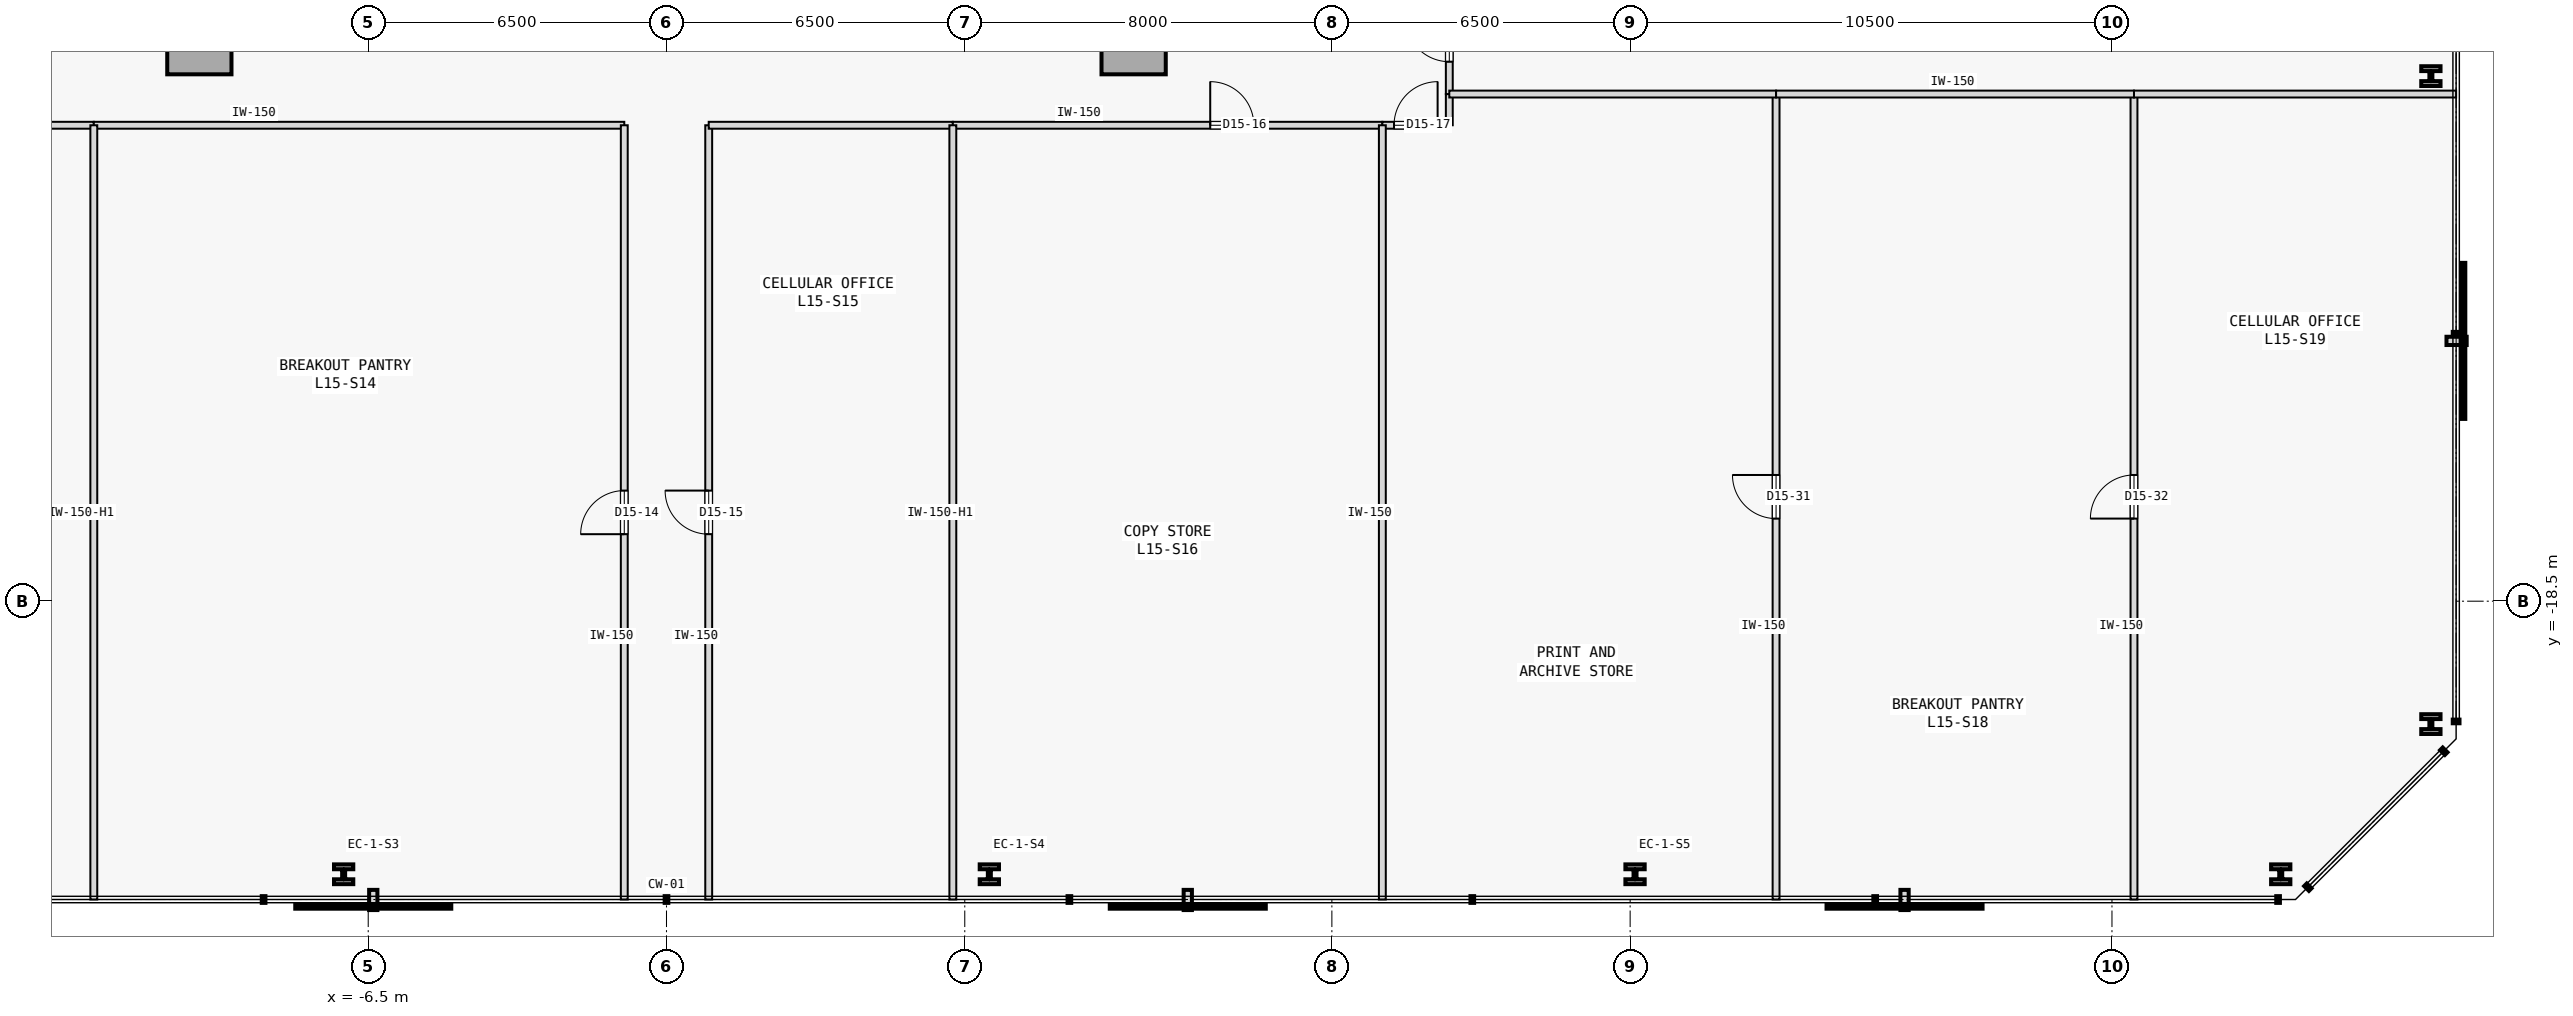
"""IFC4 building model, lengths in metres.
Left out: names, types, materials, properties, quantities, classifications, styles, units other than length and angle.
Written with IfcOpenShell. Run it as: python <this file> out.ifc"""

import sys

from ifc_helpers import new_model, si_unit, direction, frame, frame_2d, origin, origin_2d, place, context, subcontext, project, spatial, rectangle, i_section, extrude, element, fill, save


model = new_model("IFC4")
c1 = context("Model", 3, precision=1e-05, world=origin(), true_north=direction((0.0, 1.0)))
c2 = subcontext(c1, "Body", "Model", "MODEL_VIEW")
j1 = project(units=[si_unit("LENGTHUNIT", "METRE"), si_unit("PLANEANGLEUNIT", "RADIAN")], contexts=[c1])
p1 = place(None, origin())
s1 = spatial("IfcSite", under=j1, at=p1, CompositionType="ELEMENT")
p2 = place(p1, origin())
s2 = spatial("IfcBuilding", under=s1, at=p2, CompositionType="ELEMENT")
p3 = place(p2, frame((0.0, 0.0, 63.6)))
s3 = spatial("IfcBuildingStorey", under=s2, at=p3, CompositionType="ELEMENT", Elevation=63.6)
for number, where, z_axis, x_axis in (
    (1, (-10.18, -6.32, 0.0), (0.0, 0.0, 1.0), (1.0, 0.0, 0.0)),
    (2, (10.18, -6.32, 0.0), (0.0, 0.0, 1.0), (1.0, 0.0, 0.0)),
):
    element("IfcColumn", number, at=place(p3, frame(where, z_axis=z_axis, x_axis=x_axis)), inside=s3, PredefinedType="COLUMN", context=c2, shape_type="SweptSolid", body=[
        extrude(rectangle(XDim=1.4, YDim=1.4, at=origin_2d()), origin(), (0.0, 0.0, 1.0), 3.8),
    ])
for number, where, z_axis, x_axis in (
    (3, (-7.036, -24.45, 0.0), (0.0, 0.0, 1.0), (1.0, 0.0, 0.0)),
    (4, (7.036, -24.45, 0.0), (0.0, 0.0, 1.0), (1.0, 0.0, 0.0)),
    (5, (21.107, -24.45, 0.0), (0.0, 0.0, 1.0), (1.0, 0.0, 0.0)),
    (6, (35.178, -24.45, 0.0), (0.0, 0.0, 1.0), (1.0, 0.0, 0.0)),
    (7, (38.45, -21.178, 0.0), (0.0, 0.0, 1.0), (1.0, 0.0, 0.0)),
    (8, (38.45, -7.059, 0.0), (0.0, 0.0, 1.0), (1.0, 0.0, 0.0)),
):
    element("IfcColumn", number, at=place(p3, frame(where, z_axis=z_axis, x_axis=x_axis)), inside=s3, PredefinedType="COLUMN", context=c2, shape_type="SweptSolid", body=[
        extrude(i_section(OverallWidth=0.42, OverallDepth=0.431, WebThickness=0.065, FlangeThickness=0.106, FilletRadius=0.015, at=origin_2d()), origin(), (0.0, 0.0, 1.0), 3.8),
    ])
p4 = place(p3, frame((-17.059, -8.13, 0.0), z_axis=(0.0, 0.0, 1.0), x_axis=(1.0, 0.0, 0.0)))
e9 = element("IfcWall", 9, at=p4, inside=s3, PredefinedType="PARTITIONING", context=c2, shape_type="SweptSolid", body=[
    extrude(rectangle(XDim=4.579, YDim=0.15, at=frame_2d((2.29, 0.0))), origin(), (0.0, 0.0, 1.0), 3.575),
])
p5 = place(p4, frame((1.814, 0.0, 0.0)))
e10 = element("IfcOpeningElement", 10, at=p5, cuts=e9, PredefinedType="OPENING", context=c2, shape_type="SweptSolid", body=[
    extrude(rectangle(XDim=0.95, YDim=2.15, at=frame_2d((0.475, 1.075))), frame((0.0, 0.085, 0.0), z_axis=(0.0, -1.0, 0.0), x_axis=(1.0, 0.0, 0.0)), (0.0, 0.0, 1.0), 0.17),
])
p6 = place(p3, frame((-12.48, -8.13, 0.0), z_axis=(0.0, 0.0, 1.0), x_axis=(1.0, 0.0, 0.0)))
e11 = element("IfcWall", 11, at=p6, inside=s3, PredefinedType="PARTITIONING", context=c2, shape_type="SweptSolid", body=[
    extrude(rectangle(XDim=11.56, YDim=0.15, at=frame_2d((5.78, 0.0))), origin(), (0.0, 0.0, 1.0), 3.575),
])
p7 = place(p3, frame((-0.92, -25.0, 0.0), z_axis=(0.0, 0.0, 1.0), x_axis=(0.0, 1.0, 0.0)))
e12 = element("IfcWall", 12, at=p7, inside=s3, PredefinedType="PARTITIONING", context=c2, shape_type="SweptSolid", body=[
    extrude(rectangle(XDim=16.87, YDim=0.15, at=frame_2d((8.435, 0.0))), origin(), (0.0, 0.0, 1.0), 3.575),
])
p8 = place(p7, frame((7.96, 0.0, 0.0)))
e13 = element("IfcOpeningElement", 13, at=p8, cuts=e12, PredefinedType="OPENING", context=c2, shape_type="SweptSolid", body=[
    extrude(rectangle(XDim=0.95, YDim=2.15, at=frame_2d((0.475, 1.075))), frame((0.0, 0.085, 0.0), z_axis=(0.0, -1.0, 0.0), x_axis=(1.0, 0.0, 0.0)), (0.0, 0.0, 1.0), 0.17),
])
p9 = place(p3, frame((0.92, -25.0, 0.0), z_axis=(0.0, 0.0, 1.0), x_axis=(0.0, 1.0, 0.0)))
e14 = element("IfcWall", 14, at=p9, inside=s3, PredefinedType="PARTITIONING", context=c2, shape_type="SweptSolid", body=[
    extrude(rectangle(XDim=16.87, YDim=0.15, at=frame_2d((8.435, 0.0))), origin(), (0.0, 0.0, 1.0), 3.575),
])
p10 = place(p9, frame((7.96, 0.0, 0.0)))
e15 = element("IfcOpeningElement", 15, at=p10, cuts=e14, PredefinedType="OPENING", context=c2, shape_type="SweptSolid", body=[
    extrude(rectangle(XDim=0.95, YDim=2.15, at=frame_2d((0.475, 1.075))), frame((0.0, 0.085, 0.0), z_axis=(0.0, -1.0, 0.0), x_axis=(1.0, 0.0, 0.0)), (0.0, 0.0, 1.0), 0.17),
])
p11 = place(p3, frame((0.92, -8.13, 0.0), z_axis=(0.0, 0.0, 1.0), x_axis=(1.0, 0.0, 0.0)))
e16 = element("IfcWall", 16, at=p11, inside=s3, PredefinedType="PARTITIONING", context=c2, shape_type="SweptSolid", body=[
    extrude(rectangle(XDim=5.32, YDim=0.15, at=frame_2d((2.66, 0.0))), origin(), (0.0, 0.0, 1.0), 3.575),
])
p12 = place(p3, frame((6.24, -8.13, 0.0), z_axis=(0.0, 0.0, 1.0), x_axis=(1.0, 0.0, 0.0)))
e17 = element("IfcWall", 17, at=p12, inside=s3, PredefinedType="PARTITIONING", context=c2, shape_type="SweptSolid", body=[
    extrude(rectangle(XDim=9.36, YDim=0.15, at=frame_2d((4.68, 0.0))), origin(), (0.0, 0.0, 1.0), 3.575),
])
p13 = place(p12, frame((5.609, 0.0, 0.0)))
e18 = element("IfcOpeningElement", 18, at=p13, cuts=e17, PredefinedType="OPENING", context=c2, shape_type="SweptSolid", body=[
    extrude(rectangle(XDim=0.95, YDim=2.15, at=frame_2d((0.475, 1.075))), frame((0.0, 0.085, 0.0), z_axis=(0.0, -1.0, 0.0), x_axis=(1.0, 0.0, 0.0)), (0.0, 0.0, 1.0), 0.17),
])
p14 = place(p3, frame((15.6, -8.13, 0.0), z_axis=(0.0, 0.0, 1.0), x_axis=(1.0, 0.0, 0.0)))
e19 = element("IfcWall", 19, at=p14, inside=s3, PredefinedType="PARTITIONING", context=c2, shape_type="SweptSolid", body=[
    extrude(rectangle(XDim=1.459, YDim=0.15, at=frame_2d((0.729, 0.0))), origin(), (0.0, 0.0, 1.0), 3.575),
])
p15 = place(p14, frame((0.254, 0.0, 0.0)))
e20 = element("IfcOpeningElement", 20, at=p15, cuts=e19, PredefinedType="OPENING", context=c2, shape_type="SweptSolid", body=[
    extrude(rectangle(XDim=0.95, YDim=2.15, at=frame_2d((0.475, 1.075))), frame((0.0, 0.085, 0.0), z_axis=(0.0, -1.0, 0.0), x_axis=(1.0, 0.0, 0.0)), (0.0, 0.0, 1.0), 0.17),
])
p16 = place(p3, frame((17.059, -8.13, 0.0), z_axis=(0.0, 0.0, 1.0), x_axis=(0.0, 1.0, 0.0)))
e21 = element("IfcWall", 21, at=p16, inside=s3, PredefinedType="PARTITIONING", context=c2, shape_type="SweptSolid", body=[
    extrude(rectangle(XDim=0.68, YDim=0.15, at=frame_2d((0.34, 0.0))), origin(), (0.0, 0.0, 1.0), 3.575),
])
p17 = place(p3, frame((17.059, -7.45, 0.0), z_axis=(0.0, 0.0, 1.0), x_axis=(0.0, 1.0, 0.0)))
e22 = element("IfcWall", 22, at=p17, inside=s3, PredefinedType="PARTITIONING", context=c2, shape_type="SweptSolid", body=[
    extrude(rectangle(XDim=5.364, YDim=0.15, at=frame_2d((2.682, 0.0))), origin(), (0.0, 0.0, 1.0), 3.575),
])
p18 = place(p17, frame((0.705, 0.0, 0.0)))
e23 = element("IfcOpeningElement", 23, at=p18, cuts=e22, PredefinedType="OPENING", context=c2, shape_type="SweptSolid", body=[
    extrude(rectangle(XDim=0.95, YDim=2.15, at=frame_2d((0.475, 1.075))), frame((0.0, 0.085, 0.0), z_axis=(0.0, -1.0, 0.0), x_axis=(1.0, 0.0, 0.0)), (0.0, 0.0, 1.0), 0.17),
])
for number, where, z_axis, x_axis in (
    (24, (-12.48, -25.0, 0.0), (0.0, 0.0, 1.0), (0.0, 1.0, 0.0)),
    (25, (6.24, -25.0, 0.0), (0.0, 0.0, 1.0), (0.0, 1.0, 0.0)),
):
    element("IfcWall", number, at=place(p3, frame(where, z_axis=z_axis, x_axis=x_axis)), inside=s3, PredefinedType="PARTITIONING", context=c2, shape_type="SweptSolid", body=[
        extrude(rectangle(XDim=16.87, YDim=0.15, at=frame_2d((8.435, 0.0))), origin(), (0.0, 0.0, 1.0), 3.125),
    ])
p19 = place(p3, frame((15.6, -25.0, 0.0), z_axis=(0.0, 0.0, 1.0), x_axis=(0.0, 1.0, 0.0)))
e26 = element("IfcWall", 26, at=p19, inside=s3, PredefinedType="PARTITIONING", context=c2, shape_type="SweptSolid", body=[
    extrude(rectangle(XDim=16.87, YDim=0.15, at=frame_2d((8.435, 0.0))), origin(), (0.0, 0.0, 1.0), 3.575),
])
p20 = place(p3, frame((24.18, -25.0, 0.0), z_axis=(0.0, 0.0, 1.0), x_axis=(0.0, 1.0, 0.0)))
e27 = element("IfcWall", 27, at=p20, inside=s3, PredefinedType="PARTITIONING", context=c2, shape_type="SweptSolid", body=[
    extrude(rectangle(XDim=17.55, YDim=0.15, at=frame_2d((8.775, 0.0))), origin(), (0.0, 0.0, 1.0), 3.575),
])
p21 = place(p20, frame((8.3, 0.0, 0.0)))
e28 = element("IfcOpeningElement", 28, at=p21, cuts=e27, PredefinedType="OPENING", context=c2, shape_type="SweptSolid", body=[
    extrude(rectangle(XDim=0.95, YDim=2.15, at=frame_2d((0.475, 1.075))), frame((0.0, 0.085, 0.0), z_axis=(0.0, -1.0, 0.0), x_axis=(1.0, 0.0, 0.0)), (0.0, 0.0, 1.0), 0.17),
])
p22 = place(p3, frame((17.059, -7.45, 0.0), z_axis=(0.0, 0.0, 1.0), x_axis=(1.0, 0.0, 0.0)))
e29 = element("IfcWall", 29, at=p22, inside=s3, PredefinedType="PARTITIONING", context=c2, shape_type="SweptSolid", body=[
    extrude(rectangle(XDim=7.121, YDim=0.15, at=frame_2d((3.561, 0.0))), origin(), (0.0, 0.0, 1.0), 3.575),
])
p23 = place(p3, frame((31.98, -25.0, 0.0), z_axis=(0.0, 0.0, 1.0), x_axis=(0.0, 1.0, 0.0)))
e30 = element("IfcWall", 30, at=p23, inside=s3, PredefinedType="PARTITIONING", context=c2, shape_type="SweptSolid", body=[
    extrude(rectangle(XDim=17.55, YDim=0.15, at=frame_2d((8.775, 0.0))), origin(), (0.0, 0.0, 1.0), 3.575),
])
p24 = place(p23, frame((8.3, 0.0, 0.0)))
e31 = element("IfcOpeningElement", 31, at=p24, cuts=e30, PredefinedType="OPENING", context=c2, shape_type="SweptSolid", body=[
    extrude(rectangle(XDim=0.95, YDim=2.15, at=frame_2d((0.475, 1.075))), frame((0.0, 0.085, 0.0), z_axis=(0.0, -1.0, 0.0), x_axis=(1.0, 0.0, 0.0)), (0.0, 0.0, 1.0), 0.17),
])
p25 = place(p3, frame((24.18, -7.45, 0.0), z_axis=(0.0, 0.0, 1.0), x_axis=(1.0, 0.0, 0.0)))
e32 = element("IfcWall", 32, at=p25, inside=s3, PredefinedType="PARTITIONING", context=c2, shape_type="SweptSolid", body=[
    extrude(rectangle(XDim=7.8, YDim=0.15, at=frame_2d((3.9, 0.0))), origin(), (0.0, 0.0, 1.0), 3.575),
])
p26 = place(p3, frame((31.98, -7.45, 0.0), z_axis=(0.0, 0.0, 1.0), x_axis=(1.0, 0.0, 0.0)))
e33 = element("IfcWall", 33, at=p26, inside=s3, PredefinedType="PARTITIONING", context=c2, shape_type="SweptSolid", body=[
    extrude(rectangle(XDim=7.02, YDim=0.15, at=frame_2d((3.51, 0.0))), origin(), (0.0, 0.0, 1.0), 3.575),
])
p27 = place(p8, origin())
e34 = element("IfcDoor", 34, at=p27, inside=s3, OperationType="SINGLE_SWING_LEFT", PredefinedType="DOOR", context=c2, shape_type="SweptSolid", body=[
    extrude(rectangle(XDim=0.95, YDim=2.15, at=frame_2d((0.475, 1.075))), frame((0.0, 0.025, 0.0), z_axis=(0.0, -1.0, 0.0), x_axis=(1.0, 0.0, 0.0)), (0.0, 0.0, 1.0), 0.05),
])
fill(e13, e34)
p28 = place(p10, origin())
e35 = element("IfcDoor", 35, at=p28, inside=s3, OperationType="SINGLE_SWING_RIGHT", PredefinedType="DOOR", context=c2, shape_type="SweptSolid", body=[
    extrude(rectangle(XDim=0.95, YDim=2.15, at=frame_2d((0.475, 1.075))), frame((0.0, 0.025, 0.0), z_axis=(0.0, -1.0, 0.0), x_axis=(1.0, 0.0, 0.0)), (0.0, 0.0, 1.0), 0.05),
])
fill(e15, e35)
p29 = place(p13, origin())
e36 = element("IfcDoor", 36, at=p29, inside=s3, OperationType="SINGLE_SWING_LEFT", PredefinedType="DOOR", context=c2, shape_type="SweptSolid", body=[
    extrude(rectangle(XDim=0.95, YDim=2.15, at=frame_2d((0.475, 1.075))), frame((0.0, 0.025, 0.0), z_axis=(0.0, -1.0, 0.0), x_axis=(1.0, 0.0, 0.0)), (0.0, 0.0, 1.0), 0.05),
])
fill(e18, e36)
p30 = place(p15, origin())
e37 = element("IfcDoor", 37, at=p30, inside=s3, OperationType="SINGLE_SWING_RIGHT", PredefinedType="DOOR", context=c2, shape_type="SweptSolid", body=[
    extrude(rectangle(XDim=0.95, YDim=2.15, at=frame_2d((0.475, 1.075))), frame((0.0, 0.025, 0.0), z_axis=(0.0, -1.0, 0.0), x_axis=(1.0, 0.0, 0.0)), (0.0, 0.0, 1.0), 0.05),
])
fill(e20, e37)
p31 = place(p18, origin())
e38 = element("IfcDoor", 38, at=p31, inside=s3, OperationType="SINGLE_SWING_RIGHT", PredefinedType="DOOR", context=c2, shape_type="SweptSolid", body=[
    extrude(rectangle(XDim=0.95, YDim=2.15, at=frame_2d((0.475, 1.075))), frame((0.0, 0.025, 0.0), z_axis=(0.0, -1.0, 0.0), x_axis=(1.0, 0.0, 0.0)), (0.0, 0.0, 1.0), 0.05),
])
fill(e23, e38)
p32 = place(p21, origin())
e39 = element("IfcDoor", 39, at=p32, inside=s3, OperationType="SINGLE_SWING_RIGHT", PredefinedType="DOOR", context=c2, shape_type="SweptSolid", body=[
    extrude(rectangle(XDim=0.95, YDim=2.15, at=frame_2d((0.475, 1.075))), frame((0.0, 0.025, 0.0), z_axis=(0.0, -1.0, 0.0), x_axis=(1.0, 0.0, 0.0)), (0.0, 0.0, 1.0), 0.05),
])
fill(e28, e39)
p33 = place(p24, origin())
e40 = element("IfcDoor", 40, at=p33, inside=s3, OperationType="SINGLE_SWING_LEFT", PredefinedType="DOOR", context=c2, shape_type="SweptSolid", body=[
    extrude(rectangle(XDim=0.95, YDim=2.15, at=frame_2d((0.475, 1.075))), frame((0.0, 0.025, 0.0), z_axis=(0.0, -1.0, 0.0), x_axis=(1.0, 0.0, 0.0)), (0.0, 0.0, 1.0), 0.05),
])
fill(e31, e40)
save(model, sys.argv[1])
